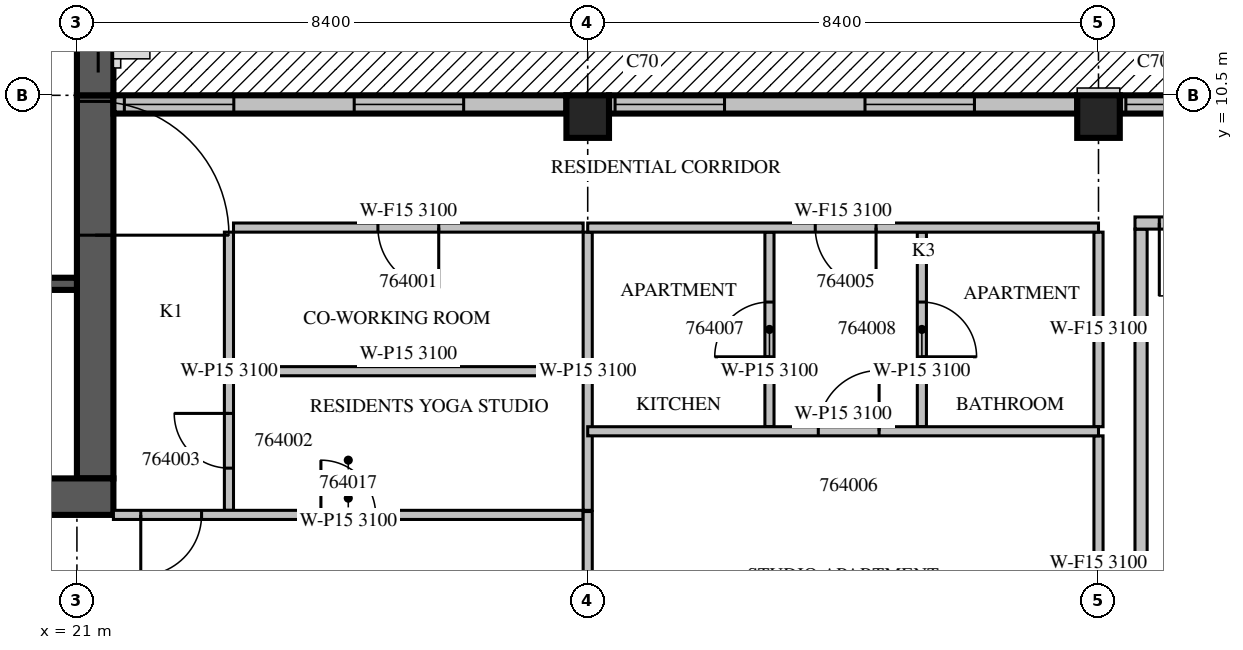
"""IFC4 building model, lengths in metres.
Left out: names, types, materials, properties, quantities, classifications, styles, units other than length and angle.
Written with IfcOpenShell. Run it as: python <this file> out.ifc"""

import sys

from ifc_helpers import new_model, si_unit, direction, frame, frame_2d, origin, origin_2d, place, context, subcontext, project, spatial, rectangle, extrude, source, transform, mapped, element, fill, save


model = new_model("IFC4")
c1 = context("Model", 3, precision=1e-05, world=origin(), true_north=direction((0.0, 1.0)))
c2 = subcontext(c1, "Body", "Model", "MODEL_VIEW")
j1 = project(units=[si_unit("LENGTHUNIT", "METRE"), si_unit("PLANEANGLEUNIT", "RADIAN")], contexts=[c1])
p1 = place(None, origin())
s1 = spatial("IfcSite", under=j1, at=p1, CompositionType="ELEMENT")
p2 = place(p1, origin())
s2 = spatial("IfcBuilding", under=s1, at=p2, CompositionType="ELEMENT")
p3 = place(p2, frame((0.0, 0.0, 284.5)))
s3 = spatial("IfcBuildingStorey", under=s2, at=p3, CompositionType="ELEMENT", Elevation=284.5)
m1 = source(origin(), c2, "Body", "SweptSolid", [
    extrude(rectangle(XDim=0.7, YDim=0.7, at=origin_2d()), origin(), (0.0, 0.0, 1.0), 3.5),
])
for number, where, z_axis, x_axis in (
    (1, (29.4, 10.15, 0.0), (0.0, 0.0, 1.0), (1.0, 0.0, 0.0)),
    (2, (37.8, 10.15, 0.0), (0.0, 0.0, 1.0), (1.0, 0.0, 0.0)),
):
    element("IfcColumn", number, at=place(p3, frame(where, z_axis=z_axis, x_axis=x_axis)), inside=s3, PredefinedType="COLUMN", context=c2, shape_type="MappedRepresentation", body=[
        mapped(m1, transform((0.0, 0.0, 0.0), scale=1.0)),
    ])
p4 = place(p3, frame((21.3, 4.2, 0.0), z_axis=(0.0, 0.0, 1.0), x_axis=(0.0, 1.0, 0.0)))
e3 = element("IfcWall", 3, at=p4, inside=s3, PredefinedType="SHEAR", context=c2, shape_type="SweptSolid", body=[
    extrude(rectangle(XDim=6.3, YDim=0.6, at=frame_2d((3.15, 0.0))), origin(), (0.0, 0.0, 1.0), 3.5),
])
p5 = place(p4, frame((4.0, 0.0, 0.0)))
e4 = element("IfcOpeningElement", 4, at=p5, cuts=e3, PredefinedType="OPENING", context=c2, shape_type="SweptSolid", body=[
    extrude(rectangle(XDim=2.2, YDim=2.1, at=frame_2d((1.1, 1.05))), frame((0.0, 0.31, 0.0), z_axis=(0.0, -1.0, 0.0), x_axis=(1.0, 0.0, 0.0)), (0.0, 0.0, 1.0), 0.62),
])
m2 = source(origin(), c2, "Body", "SweptSolid", [
    extrude(rectangle(XDim=17.4, YDim=0.6, at=frame_2d((8.7, 0.0))), origin(), (0.0, 0.0, 1.0), 3.5),
])
p6 = place(p3, frame((4.2, 3.9, 0.0), z_axis=(0.0, 0.0, 1.0), x_axis=(1.0, 0.0, 0.0)))
e5 = element("IfcWall", 5, at=p6, inside=s3, PredefinedType="SHEAR", context=c2, shape_type="MappedRepresentation", body=[
    mapped(m2, transform((0.0, 0.0, 0.0), scale=1.0)),
])
p7 = place(p6, frame((11.55, 0.0, 0.0)))
e6 = element("IfcOpeningElement", 6, at=p7, cuts=e5, PredefinedType="OPENING", context=c2, shape_type="SweptSolid", body=[
    extrude(rectangle(XDim=0.9, YDim=2.1, at=frame_2d((0.45, 1.05))), frame((0.0, 0.31, 0.0), z_axis=(0.0, -1.0, 0.0), x_axis=(1.0, 0.0, 0.0)), (0.0, 0.0, 1.0), 0.62),
])
p8 = place(p3, frame((21.3, 10.5, 0.0), z_axis=(0.0, 0.0, 1.0), x_axis=(0.0, 1.0, 0.0)))
e7 = element("IfcWall", 7, at=p8, inside=s3, PredefinedType="SHEAR", context=c2, shape_type="SweptSolid", body=[
    extrude(rectangle(XDim=10.5, YDim=0.6, at=frame_2d((5.25, 0.0))), origin(), (0.0, 0.0, 1.0), 3.5),
])
p9 = place(p8, frame((5.7, 0.0, 0.6)))
e8 = element("IfcOpeningElement", 8, at=p9, cuts=e7, PredefinedType="OPENING", context=c2, shape_type="SweptSolid", body=[
    extrude(rectangle(XDim=1.2, YDim=2.4, at=frame_2d((0.6, 1.2))), frame((0.0, 0.31, 0.0), z_axis=(0.0, -1.0, 0.0), x_axis=(1.0, 0.0, 0.0)), (0.0, 0.0, 1.0), 0.62),
])
m3 = source(origin(), c2, "Body", "SweptSolid", [
    extrude(rectangle(XDim=7.7, YDim=0.3, at=frame_2d((3.85, 0.0))), origin(), (0.0, 0.0, 1.0), 3.1),
])
p10 = place(p3, frame((45.85, 10.35, 0.0), z_axis=(0.0, 0.0, 1.0), x_axis=(-1.0, 0.0, 0.0)))
e9 = element("IfcWall", 9, at=p10, inside=s3, PredefinedType="STANDARD", context=c2, shape_type="MappedRepresentation", body=[
    mapped(m3, transform((0.0, 0.0, 0.0), scale=1.0)),
])
m4 = source(origin(), c2, "Body", "SweptSolid", [
    extrude(rectangle(XDim=1.8, YDim=2.4, at=frame_2d((0.9, 1.2))), frame((0.0, 0.16, 0.0), z_axis=(0.0, -1.0, 0.0), x_axis=(1.0, 0.0, 0.0)), (0.0, 0.0, 1.0), 0.32),
])
p11 = place(p10, frame((1.69, 0.0, 0.0)))
e10 = element("IfcOpeningElement", 10, at=p11, cuts=e9, PredefinedType="OPENING", context=c2, shape_type="MappedRepresentation", body=[
    mapped(m4, transform((0.0, 0.0, 0.0), scale=1.0)),
])
p12 = place(p10, frame((5.8, 0.0, 0.0)))
e11 = element("IfcOpeningElement", 11, at=p12, cuts=e9, PredefinedType="OPENING", context=c2, shape_type="MappedRepresentation", body=[
    mapped(m4, transform((0.0, 0.0, 0.0), scale=1.0)),
])
p13 = place(p3, frame((37.45, 10.35, 0.0), z_axis=(0.0, 0.0, 1.0), x_axis=(-1.0, 0.0, 0.0)))
e12 = element("IfcWall", 12, at=p13, inside=s3, PredefinedType="STANDARD", context=c2, shape_type="MappedRepresentation", body=[
    mapped(m3, transform((0.0, 0.0, 0.0), scale=1.0)),
])
p14 = place(p13, frame((1.69, 0.0, 0.0)))
e13 = element("IfcOpeningElement", 13, at=p14, cuts=e12, PredefinedType="OPENING", context=c2, shape_type="MappedRepresentation", body=[
    mapped(m4, transform((0.0, 0.0, 0.0), scale=1.0)),
])
p15 = place(p13, frame((5.8, 0.0, 0.0)))
e14 = element("IfcOpeningElement", 14, at=p15, cuts=e12, PredefinedType="OPENING", context=c2, shape_type="MappedRepresentation", body=[
    mapped(m4, transform((0.0, 0.0, 0.0), scale=1.0)),
])
p16 = place(p3, frame((29.05, 10.35, 0.0), z_axis=(0.0, 0.0, 1.0), x_axis=(-1.0, 0.0, 0.0)))
e15 = element("IfcWall", 15, at=p16, inside=s3, PredefinedType="STANDARD", context=c2, shape_type="SweptSolid", body=[
    extrude(rectangle(XDim=7.45, YDim=0.3, at=frame_2d((3.725, 0.0))), origin(), (0.0, 0.0, 1.0), 3.1),
])
p17 = place(p16, frame((1.69, 0.0, 0.0)))
e16 = element("IfcOpeningElement", 16, at=p17, cuts=e15, PredefinedType="OPENING", context=c2, shape_type="MappedRepresentation", body=[
    mapped(m4, transform((0.0, 0.0, 0.0), scale=1.0)),
])
p18 = place(p16, frame((5.47, 0.0, 0.0)))
e17 = element("IfcOpeningElement", 17, at=p18, cuts=e15, PredefinedType="OPENING", context=c2, shape_type="MappedRepresentation", body=[
    mapped(m4, transform((0.0, 0.0, 0.0), scale=1.0)),
])
p19 = place(p3, frame((13.8, 7.4, 0.0), z_axis=(0.0, 0.0, 1.0), x_axis=(1.0, 0.0, 0.0)))
e18 = element("IfcWall", 18, at=p19, inside=s3, PredefinedType="SOLIDWALL", context=c2, shape_type="SweptSolid", body=[
    extrude(rectangle(XDim=7.2, YDim=0.2, at=frame_2d((3.6, 0.0))), origin(), (0.0, 0.0, 1.0), 3.1),
])
m5 = source(origin(), c2, "Body", "SweptSolid", [
    extrude(rectangle(XDim=0.9, YDim=2.1, at=frame_2d((0.45, 1.05))), frame((0.0, 0.11, 0.0), z_axis=(0.0, -1.0, 0.0), x_axis=(1.0, 0.0, 0.0)), (0.0, 0.0, 1.0), 0.22),
])
p20 = place(p19, frame((1.95, 0.0, 0.0)))
e19 = element("IfcOpeningElement", 19, at=p20, cuts=e18, PredefinedType="OPENING", context=c2, shape_type="MappedRepresentation", body=[
    mapped(m5, transform((0.0, 0.0, 0.0), scale=1.0)),
])
p21 = place(p3, frame((38.5, 0.3, 0.0), z_axis=(0.0, 0.0, 1.0), x_axis=(0.0, 1.0, 0.0)))
e20 = element("IfcWall", 20, at=p21, inside=s3, PredefinedType="PARTITIONING", context=c2, shape_type="SweptSolid", body=[
    extrude(rectangle(XDim=8.0, YDim=0.2, at=frame_2d((4.0, 0.0))), origin(), (0.0, 0.0, 1.0), 3.1),
])
p22 = place(p3, frame((38.4, 8.4, 0.0), z_axis=(0.0, 0.0, 1.0), x_axis=(1.0, 0.0, 0.0)))
e21 = element("IfcWall", 21, at=p22, inside=s3, PredefinedType="PARTITIONING", context=c2, shape_type="SweptSolid", body=[
    extrude(rectangle(XDim=5.45, YDim=0.2, at=frame_2d((2.725, 0.0))), origin(), (0.0, 0.0, 1.0), 3.1),
])
m6 = source(origin(), c2, "Body", "SweptSolid", [
    extrude(rectangle(XDim=1.2, YDim=2.1, at=frame_2d((0.6, 1.05))), frame((0.0, 0.11, 0.0), z_axis=(0.0, -1.0, 0.0), x_axis=(1.0, 0.0, 0.0)), (0.0, 0.0, 1.0), 0.22),
])
p23 = place(p22, frame((0.4, 0.0, 0.0)))
e22 = element("IfcOpeningElement", 22, at=p23, cuts=e21, PredefinedType="OPENING", context=c2, shape_type="MappedRepresentation", body=[
    mapped(m6, transform((0.0, 0.0, 0.0), scale=1.0)),
])
p24 = place(p22, frame((3.25, 0.0, 0.0)))
e23 = element("IfcOpeningElement", 23, at=p24, cuts=e21, PredefinedType="OPENING", context=c2, shape_type="MappedRepresentation", body=[
    mapped(m5, transform((0.0, 0.0, 0.0), scale=1.0)),
])
p25 = place(p3, frame((23.5, 8.25, 0.0), z_axis=(0.0, 0.0, 1.0), x_axis=(0.0, -1.0, 0.0)))
e24 = element("IfcWall", 24, at=p25, inside=s3, PredefinedType="PARTITIONING", context=c2, shape_type="SweptSolid", body=[
    extrude(rectangle(XDim=4.575, YDim=0.15, at=frame_2d((2.288, 0.0))), origin(), (0.0, 0.0, 1.0), 3.1),
])
m7 = source(origin(), c2, "Body", "SweptSolid", [
    extrude(rectangle(XDim=0.9, YDim=2.1, at=frame_2d((0.45, 1.05))), frame((0.0, 0.085, 0.0), z_axis=(0.0, -1.0, 0.0), x_axis=(1.0, 0.0, 0.0)), (0.0, 0.0, 1.0), 0.17),
])
p26 = place(p25, frame((2.981, 0.0, 0.0)))
e25 = element("IfcOpeningElement", 25, at=p26, cuts=e24, PredefinedType="OPENING", context=c2, shape_type="MappedRepresentation", body=[
    mapped(m7, transform((0.0, 0.0, 0.0), scale=1.0)),
])
m8 = source(origin(), c2, "Body", "SweptSolid", [
    extrude(rectangle(XDim=4.575, YDim=0.15, at=frame_2d((2.288, 0.0))), origin(), (0.0, 0.0, 1.0), 3.1),
])
p27 = place(p3, frame((29.4, 3.675, 0.0), z_axis=(0.0, 0.0, 1.0), x_axis=(0.0, 1.0, 0.0)))
e26 = element("IfcWall", 26, at=p27, inside=s3, PredefinedType="PARTITIONING", context=c2, shape_type="MappedRepresentation", body=[
    mapped(m8, transform((0.0, 0.0, 0.0), scale=1.0)),
])
p28 = place(p3, frame((29.325, 8.325, 0.0), z_axis=(0.0, 0.0, 1.0), x_axis=(-1.0, 0.0, 0.0)))
e27 = element("IfcWall", 27, at=p28, inside=s3, PredefinedType="PARTITIONING", context=c2, shape_type="SweptSolid", body=[
    extrude(rectangle(XDim=5.75, YDim=0.15, at=frame_2d((2.875, 0.0))), origin(), (0.0, 0.0, 1.0), 3.1),
])
m9 = source(origin(), c2, "Body", "SweptSolid", [
    extrude(rectangle(XDim=1.0, YDim=2.1, at=frame_2d((0.5, 1.05))), frame((0.0, 0.085, 0.0), z_axis=(0.0, -1.0, 0.0), x_axis=(1.0, 0.0, 0.0)), (0.0, 0.0, 1.0), 0.17),
])
p29 = place(p28, frame((2.375, 0.0, 0.0)))
e28 = element("IfcOpeningElement", 28, at=p29, cuts=e27, PredefinedType="OPENING", context=c2, shape_type="MappedRepresentation", body=[
    mapped(m9, transform((0.0, 0.0, 0.0), scale=1.0)),
])
m10 = source(origin(), c2, "Body", "SweptSolid", [
    extrude(rectangle(XDim=5.75, YDim=0.15, at=frame_2d((2.875, 0.0))), origin(), (0.0, 0.0, 1.0), 3.1),
])
p30 = place(p3, frame((29.325, 5.963, 0.0), z_axis=(0.0, 0.0, 1.0), x_axis=(-1.0, 0.0, 0.0)))
e29 = element("IfcWall", 29, at=p30, inside=s3, PredefinedType="PARTITIONING", context=c2, shape_type="MappedRepresentation", body=[
    mapped(m10, transform((0.0, 0.0, 0.0), scale=1.0)),
])
p31 = place(p3, frame((21.6, 3.6, 0.0), z_axis=(0.0, 0.0, 1.0), x_axis=(1.0, 0.0, 0.0)))
e30 = element("IfcWall", 30, at=p31, inside=s3, PredefinedType="PARTITIONING", context=c2, shape_type="SweptSolid", body=[
    extrude(rectangle(XDim=7.725, YDim=0.15, at=frame_2d((3.862, 0.0))), origin(), (0.0, 0.0, 1.0), 3.1),
])
p32 = place(p31, frame((0.45, 0.0, 0.0)))
e31 = element("IfcOpeningElement", 31, at=p32, cuts=e30, PredefinedType="OPENING", context=c2, shape_type="MappedRepresentation", body=[
    mapped(m9, transform((0.0, 0.0, 0.0), scale=1.0)),
])
p33 = place(p31, frame((3.413, 0.0, 0.0)))
e32 = element("IfcOpeningElement", 32, at=p33, cuts=e30, PredefinedType="OPENING", context=c2, shape_type="MappedRepresentation", body=[
    mapped(m7, transform((0.0, 0.0, 0.0), scale=1.0)),
])
p34 = place(p3, frame((32.389, 5.05, 0.0), z_axis=(0.0, 0.0, 1.0), x_axis=(0.0, 1.0, 0.0)))
e33 = element("IfcWall", 33, at=p34, inside=s3, PredefinedType="PARTITIONING", context=c2, shape_type="SweptSolid", body=[
    extrude(rectangle(XDim=3.2, YDim=0.15, at=frame_2d((1.6, 0.0))), origin(), (0.0, 0.0, 1.0), 3.1),
])
p35 = place(p34, frame((1.15, 0.0, 0.0)))
e34 = element("IfcOpeningElement", 34, at=p35, cuts=e33, PredefinedType="OPENING", context=c2, shape_type="MappedRepresentation", body=[
    mapped(m7, transform((0.0, 0.0, 0.0), scale=1.0)),
])
m11 = source(origin(), c2, "Body", "SweptSolid", [
    extrude(rectangle(XDim=3.2, YDim=0.15, at=frame_2d((1.6, 0.0))), origin(), (0.0, 0.0, 1.0), 3.1),
])
p36 = place(p3, frame((34.895, 5.05, 0.0), z_axis=(0.0, 0.0, 1.0), x_axis=(0.0, 1.0, 0.0)))
e35 = element("IfcWall", 35, at=p36, inside=s3, PredefinedType="PARTITIONING", context=c2, shape_type="MappedRepresentation", body=[
    mapped(m11, transform((0.0, 0.0, 0.0), scale=1.0)),
])
p37 = place(p36, frame((1.15, 0.0, 0.0)))
e36 = element("IfcOpeningElement", 36, at=p37, cuts=e35, PredefinedType="OPENING", context=c2, shape_type="MappedRepresentation", body=[
    mapped(m7, transform((0.0, 0.0, 0.0), scale=1.0)),
])
p38 = place(p3, frame((29.4, 0.699, 0.0), z_axis=(0.0, 0.0, 1.0), x_axis=(0.0, 1.0, 0.0)))
e37 = element("IfcWall", 37, at=p38, inside=s3, PredefinedType="PARTITIONING", context=c2, shape_type="SweptSolid", body=[
    extrude(rectangle(XDim=2.956, YDim=0.15, at=frame_2d((1.478, 0.0))), origin(), (0.0, 0.0, 1.0), 3.1),
])
p39 = place(p3, frame((37.8, 0.699, 0.0), z_axis=(0.0, 0.0, 1.0), x_axis=(0.0, 1.0, 0.0)))
e38 = element("IfcWall", 38, at=p39, inside=s3, PredefinedType="PARTITIONING", context=c2, shape_type="SweptSolid", body=[
    extrude(rectangle(XDim=4.201, YDim=0.15, at=frame_2d((2.1, 0.0))), origin(), (0.0, 0.0, 1.0), 3.1),
])
p40 = place(p3, frame((37.8, 5.05, 0.0), z_axis=(0.0, 0.0, 1.0), x_axis=(0.0, 1.0, 0.0)))
e39 = element("IfcWall", 39, at=p40, inside=s3, PredefinedType="PARTITIONING", context=c2, shape_type="MappedRepresentation", body=[
    mapped(m11, transform((0.0, 0.0, 0.0), scale=1.0)),
])
p41 = place(p3, frame((37.8, 4.975, 0.0), z_axis=(0.0, 0.0, 1.0), x_axis=(-1.0, 0.0, 0.0)))
e40 = element("IfcWall", 40, at=p41, inside=s3, PredefinedType="PARTITIONING", context=c2, shape_type="SweptSolid", body=[
    extrude(rectangle(XDim=8.4, YDim=0.15, at=frame_2d((4.2, 0.0))), origin(), (0.0, 0.0, 1.0), 3.1),
])
p42 = place(p41, frame((3.608, 0.0, 0.0)))
e41 = element("IfcOpeningElement", 41, at=p42, cuts=e40, PredefinedType="OPENING", context=c2, shape_type="MappedRepresentation", body=[
    mapped(m9, transform((0.0, 0.0, 0.0), scale=1.0)),
])
m12 = source(origin(), c2, "Body", "SweptSolid", [
    extrude(rectangle(XDim=8.4, YDim=0.15, at=frame_2d((4.2, 0.0))), origin(), (0.0, 0.0, 1.0), 3.1),
])
p43 = place(p3, frame((37.8, 8.325, 0.0), z_axis=(0.0, 0.0, 1.0), x_axis=(-1.0, 0.0, 0.0)))
e42 = element("IfcWall", 42, at=p43, inside=s3, PredefinedType="PARTITIONING", context=c2, shape_type="MappedRepresentation", body=[
    mapped(m12, transform((0.0, 0.0, 0.0), scale=1.0)),
])
p44 = place(p43, frame((3.658, 0.0, 0.0)))
e43 = element("IfcOpeningElement", 43, at=p44, cuts=e42, PredefinedType="OPENING", context=c2, shape_type="MappedRepresentation", body=[
    mapped(m9, transform((0.0, 0.0, 0.0), scale=1.0)),
])
m13 = source(origin(), c2, "Body", "SweptSolid", [
    extrude(rectangle(XDim=1.8, YDim=2.4, at=frame_2d((0.9, 1.2))), frame((0.0, 0.025, 0.0), z_axis=(0.0, -1.0, 0.0), x_axis=(1.0, 0.0, 0.0)), (0.0, 0.0, 1.0), 0.05),
])
p45 = place(p12, origin())
e44 = element("IfcDoor", 44, at=p45, inside=s3, OperationType="SLIDING_TO_LEFT", PredefinedType="DOOR", context=c2, shape_type="MappedRepresentation", body=[
    mapped(m13, transform((0.0, 0.0, 0.0), scale=1.0)),
])
fill(e11, e44)
p46 = place(p14, origin())
e45 = element("IfcDoor", 45, at=p46, inside=s3, OperationType="SLIDING_TO_LEFT", PredefinedType="DOOR", context=c2, shape_type="MappedRepresentation", body=[
    mapped(m13, transform((0.0, 0.0, 0.0), scale=1.0)),
])
fill(e13, e45)
p47 = place(p15, origin())
e46 = element("IfcDoor", 46, at=p47, inside=s3, OperationType="SLIDING_TO_LEFT", PredefinedType="DOOR", context=c2, shape_type="MappedRepresentation", body=[
    mapped(m13, transform((0.0, 0.0, 0.0), scale=1.0)),
])
fill(e14, e46)
p48 = place(p17, origin())
e47 = element("IfcDoor", 47, at=p48, inside=s3, OperationType="SLIDING_TO_LEFT", PredefinedType="DOOR", context=c2, shape_type="MappedRepresentation", body=[
    mapped(m13, transform((0.0, 0.0, 0.0), scale=1.0)),
])
fill(e16, e47)
p49 = place(p18, origin())
e48 = element("IfcDoor", 48, at=p49, inside=s3, OperationType="SLIDING_TO_LEFT", PredefinedType="DOOR", context=c2, shape_type="MappedRepresentation", body=[
    mapped(m13, transform((0.0, 0.0, 0.0), scale=1.0)),
])
fill(e17, e48)
m14 = source(origin(), c2, "Body", "SweptSolid", [
    extrude(rectangle(XDim=1.2, YDim=2.1, at=frame_2d((0.6, 1.05))), frame((0.0, 0.025, 0.0), z_axis=(0.0, -1.0, 0.0), x_axis=(1.0, 0.0, 0.0)), (0.0, 0.0, 1.0), 0.05),
])
p50 = place(p23, origin())
e49 = element("IfcDoor", 49, at=p50, inside=s3, OperationType="SINGLE_SWING_RIGHT", PredefinedType="DOOR", context=c2, shape_type="MappedRepresentation", body=[
    mapped(m14, transform((0.0, 0.0, 0.0), scale=1.0)),
])
fill(e22, e49)
m15 = source(origin(), c2, "Body", "SweptSolid", [
    extrude(rectangle(XDim=2.2, YDim=2.1, at=frame_2d((1.1, 1.05))), frame((0.0, 0.025, 0.0), z_axis=(0.0, -1.0, 0.0), x_axis=(1.0, 0.0, 0.0)), (0.0, 0.0, 1.0), 0.05),
])
p51 = place(p5, origin())
e50 = element("IfcDoor", 50, at=p51, inside=s3, OperationType="DOUBLE_DOOR_SINGLE_SWING", PredefinedType="DOOR", context=c2, shape_type="MappedRepresentation", body=[
    mapped(m15, transform((0.0, 0.0, 0.0), scale=1.0)),
])
fill(e4, e50)
m16 = source(origin(), c2, "Body", "SweptSolid", [
    extrude(rectangle(XDim=1.0, YDim=2.1, at=frame_2d((0.5, 1.05))), frame((0.0, 0.025, 0.0), z_axis=(0.0, -1.0, 0.0), x_axis=(1.0, 0.0, 0.0)), (0.0, 0.0, 1.0), 0.05),
])
p52 = place(p29, origin())
e51 = element("IfcDoor", 51, at=p52, inside=s3, OperationType="SINGLE_SWING_LEFT", PredefinedType="DOOR", context=c2, shape_type="MappedRepresentation", body=[
    mapped(m16, transform((0.0, 0.0, 0.0), scale=1.0)),
])
fill(e28, e51)
m17 = source(origin(), c2, "Body", "SweptSolid", [
    extrude(rectangle(XDim=0.9, YDim=2.1, at=frame_2d((0.45, 1.05))), frame((0.0, 0.025, 0.0), z_axis=(0.0, -1.0, 0.0), x_axis=(1.0, 0.0, 0.0)), (0.0, 0.0, 1.0), 0.05),
])
p53 = place(p26, origin())
e52 = element("IfcDoor", 52, at=p53, inside=s3, OperationType="SINGLE_SWING_RIGHT", PredefinedType="DOOR", context=c2, shape_type="MappedRepresentation", body=[
    mapped(m17, transform((0.0, 0.0, 0.0), scale=1.0)),
])
fill(e25, e52)
p54 = place(p32, origin())
e53 = element("IfcDoor", 53, at=p54, inside=s3, OperationType="SINGLE_SWING_RIGHT", PredefinedType="DOOR", context=c2, shape_type="MappedRepresentation", body=[
    mapped(m16, transform((0.0, 0.0, 0.0), scale=1.0)),
])
fill(e31, e53)
p55 = place(p44, origin())
e54 = element("IfcDoor", 54, at=p55, inside=s3, OperationType="SINGLE_SWING_LEFT", PredefinedType="DOOR", context=c2, shape_type="MappedRepresentation", body=[
    mapped(m16, transform((0.0, 0.0, 0.0), scale=1.0)),
])
fill(e43, e54)
p56 = place(p42, origin())
e55 = element("IfcDoor", 55, at=p56, inside=s3, OperationType="SINGLE_SWING_RIGHT", PredefinedType="DOOR", context=c2, shape_type="MappedRepresentation", body=[
    mapped(m16, transform((0.0, 0.0, 0.0), scale=1.0)),
])
fill(e41, e55)
p57 = place(p35, origin())
e56 = element("IfcDoor", 56, at=p57, inside=s3, OperationType="SINGLE_SWING_LEFT", PredefinedType="DOOR", context=c2, shape_type="MappedRepresentation", body=[
    mapped(m17, transform((0.0, 0.0, 0.0), scale=1.0)),
])
fill(e34, e56)
p58 = place(p37, origin())
e57 = element("IfcDoor", 57, at=p58, inside=s3, OperationType="SINGLE_SWING_RIGHT", PredefinedType="DOOR", context=c2, shape_type="MappedRepresentation", body=[
    mapped(m17, transform((0.0, 0.0, 0.0), scale=1.0)),
])
fill(e36, e57)
p59 = place(p33, origin())
e58 = element("IfcDoor", 58, at=p59, inside=s3, OperationType="SINGLE_SWING_LEFT", PredefinedType="DOOR", context=c2, shape_type="MappedRepresentation", body=[
    mapped(m17, transform((0.0, 0.0, 0.0), scale=1.0)),
])
fill(e32, e58)
save(model, sys.argv[1])
